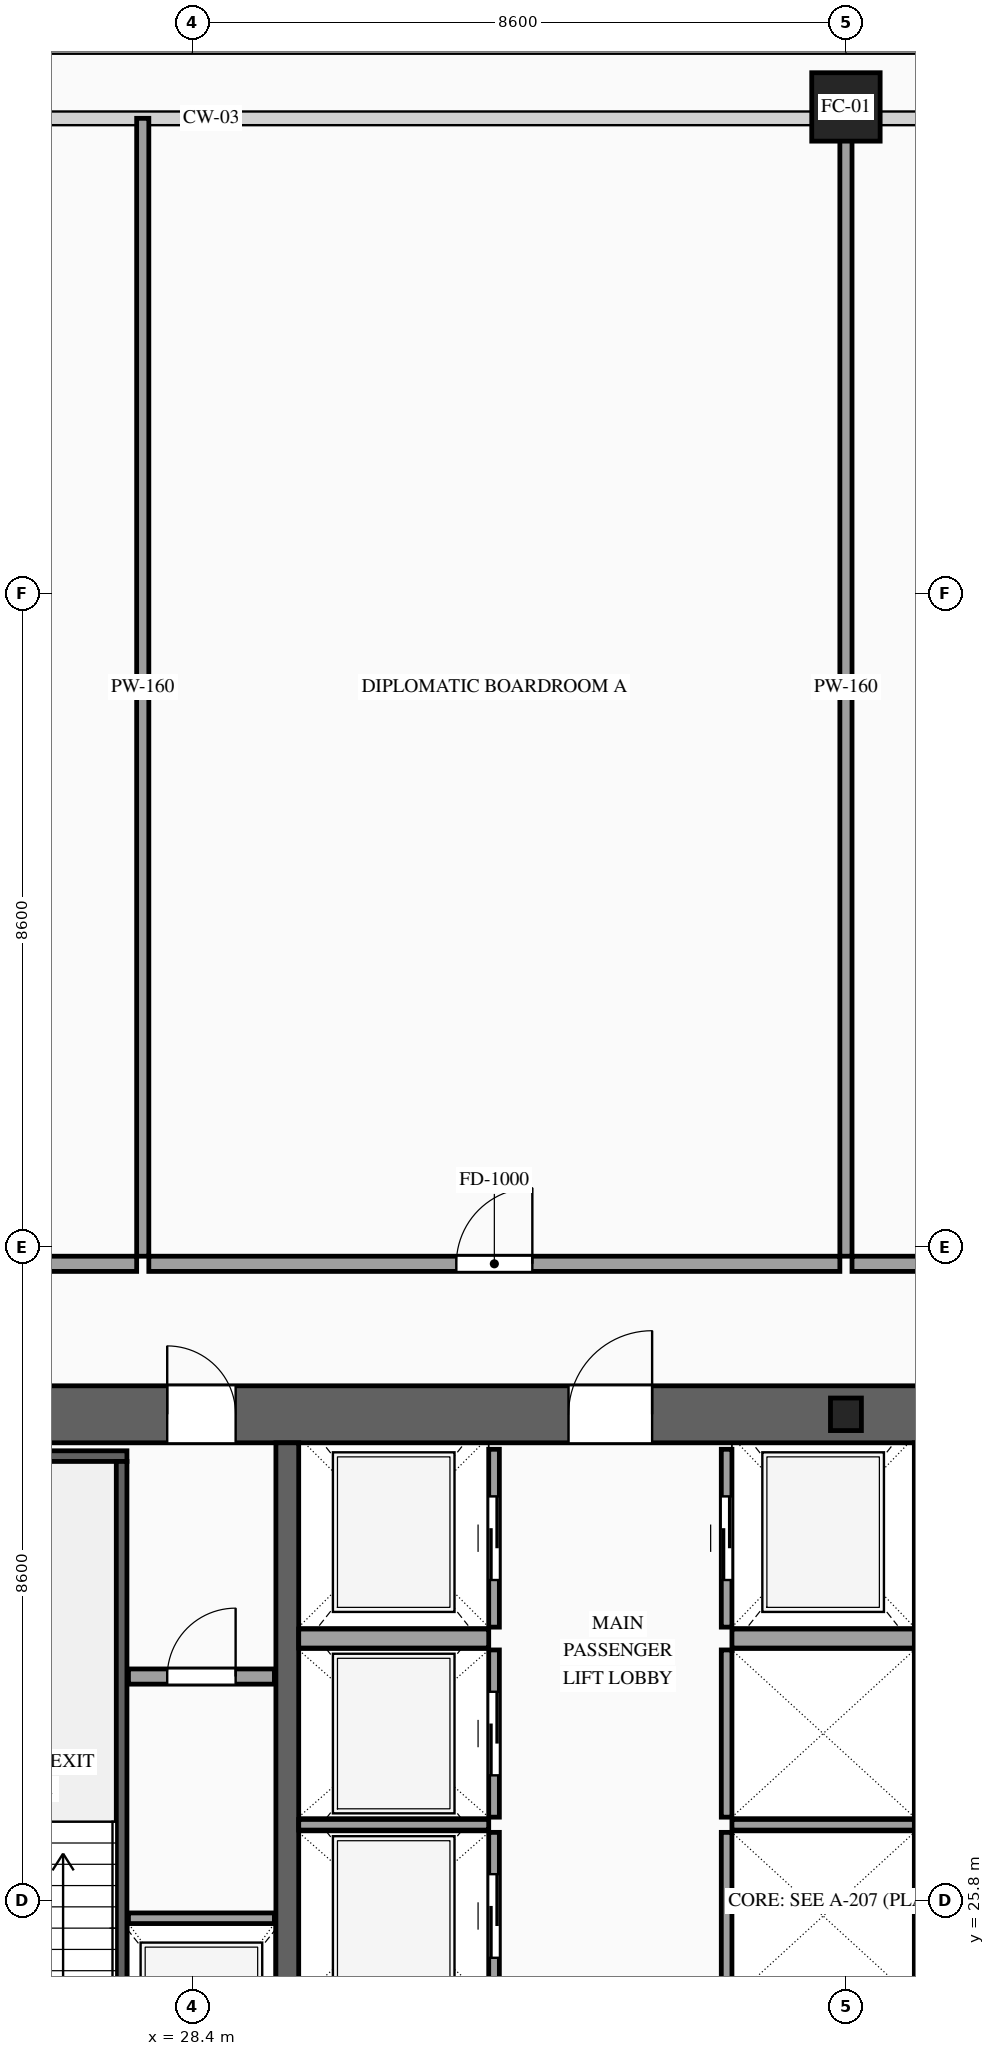
"""IFC4 building model, lengths in metres.
Left out: names, types, materials, properties, quantities, classifications, styles, units other than length and angle.
Written with IfcOpenShell. Run it as: python <this file> out.ifc"""

import sys

from ifc_helpers import new_model, si_unit, direction, frame, frame_2d, origin, origin_2d, place, context, subcontext, project, spatial, rectangle, hollow_rectangle, i_section, extrude, source, transform, mapped, element, fill, save


model = new_model("IFC4")
c1 = context("Model", 3, precision=1e-05, world=origin(), true_north=direction((0.0, 1.0)))
c2 = subcontext(c1, "Body", "Model", "MODEL_VIEW")
j1 = project(units=[si_unit("LENGTHUNIT", "METRE"), si_unit("PLANEANGLEUNIT", "RADIAN")], contexts=[c1])
p1 = place(None, origin())
s1 = spatial("IfcSite", under=j1, at=p1, CompositionType="ELEMENT")
p2 = place(p1, origin())
s2 = spatial("IfcBuilding", under=s1, at=p2, CompositionType="ELEMENT")
p3 = place(p2, frame((0.0, 0.0, 108.2)))
s3 = spatial("IfcBuildingStorey", under=s2, at=p3, CompositionType="ELEMENT", Elevation=108.2)
p4 = place(p3, frame((23.425, 32.2, 0.0), z_axis=(0.0, 0.0, 1.0), x_axis=(1.0, 0.0, 0.0)))
e1 = element("IfcWall", 1, at=p4, inside=s3, PredefinedType="SHEAR", context=c2, shape_type="SweptSolid", body=[
    extrude(rectangle(XDim=27.15, YDim=0.75, at=frame_2d((13.575, 0.0))), origin(), (0.0, 0.0, 1.0), 3.6),
])
p5 = place(p4, frame((4.645, 0.0, 0.0)))
e2 = element("IfcOpeningElement", 2, at=p5, cuts=e1, PredefinedType="OPENING", context=c2, shape_type="SweptSolid", body=[
    extrude(rectangle(XDim=0.9, YDim=2.15, at=frame_2d((0.45, 1.075))), frame((0.0, 0.39, 0.0), z_axis=(0.0, -1.0, 0.0), x_axis=(1.0, 0.0, 0.0)), (0.0, 0.0, 1.0), 0.78),
])
p6 = place(p4, frame((9.925, 0.0, 0.0)))
e3 = element("IfcOpeningElement", 3, at=p6, cuts=e1, PredefinedType="OPENING", context=c2, shape_type="SweptSolid", body=[
    extrude(rectangle(XDim=1.1, YDim=2.2, at=frame_2d((0.55, 1.1))), frame((0.0, 0.39, 0.0), z_axis=(0.0, -1.0, 0.0), x_axis=(1.0, 0.0, 0.0)), (0.0, 0.0, 1.0), 0.78),
])
p7 = place(p4, frame((15.775, 0.0, 0.0)))
e4 = element("IfcOpeningElement", 4, at=p7, cuts=e1, PredefinedType="OPENING", context=c2, shape_type="SweptSolid", body=[
    extrude(rectangle(XDim=1.1, YDim=2.2, at=frame_2d((0.55, 1.1))), frame((0.0, 0.39, 0.0), z_axis=(0.0, -1.0, 0.0), x_axis=(1.0, 0.0, 0.0)), (0.0, 0.0, 1.0), 0.78),
])
p8 = place(p4, frame((19.745, 0.0, 0.0)))
e5 = element("IfcOpeningElement", 5, at=p8, cuts=e1, PredefinedType="OPENING", context=c2, shape_type="SweptSolid", body=[
    extrude(rectangle(XDim=0.9, YDim=2.15, at=frame_2d((0.45, 1.075))), frame((0.0, 0.39, 0.0), z_axis=(0.0, -1.0, 0.0), x_axis=(1.0, 0.0, 0.0)), (0.0, 0.0, 1.0), 0.78),
])
m1 = source(origin(), c2, "Body", "SweptSolid", [
    extrude(rectangle(XDim=12.05, YDim=0.3, at=frame_2d((6.025, 0.0))), origin(), (0.0, 0.0, 1.0), 3.6),
])
for number, where, z_axis, x_axis in (
    (6, (29.65, 19.775, 0.0), (0.0, 0.0, 1.0), (0.0, 1.0, 0.0)),
    (7, (38.05, 19.775, 0.0), (0.0, 0.0, 1.0), (0.0, 1.0, 0.0)),
):
    element("IfcWall", number, at=place(p3, frame(where, z_axis=z_axis, x_axis=x_axis)), inside=s3, PredefinedType="SOLIDWALL", context=c2, shape_type="MappedRepresentation", body=[
        mapped(m1, transform((0.0, 0.0, 0.0), scale=1.0)),
    ])
m2 = source(origin(), c2, "Body", "SweptSolid", [
    extrude(i_section(OverallWidth=0.407, OverallDepth=0.428, WebThickness=0.02, FlangeThickness=0.035, at=origin_2d()), origin(), (0.0, 0.0, 1.0), 3.6),
])
p9 = place(p3, frame((37.0, 32.2, 0.0), z_axis=(0.0, 0.0, 1.0), x_axis=(1.0, 0.0, 0.0)))
e8 = element("IfcColumn", 8, at=p9, inside=s3, PredefinedType="COLUMN", context=c2, shape_type="MappedRepresentation", body=[
    mapped(m2, transform((0.0, 0.0, 0.0), scale=1.0)),
])
m3 = source(origin(), c2, "Body", "SweptSolid", [
    extrude(hollow_rectangle(XDim=0.9, YDim=0.9, WallThickness=0.042, at=origin_2d()), origin(), (0.0, 0.0, 1.0), 3.6),
])
p10 = place(p3, frame((37.0, 49.4, 0.0), z_axis=(0.0, 0.0, 1.0), x_axis=(1.0, 0.0, 0.0)))
e9 = element("IfcColumn", 9, at=p10, inside=s3, PredefinedType="COLUMN", context=c2, shape_type="MappedRepresentation", body=[
    mapped(m3, transform((0.0, 0.0, 0.0), scale=1.0)),
])
m4 = source(origin(), c2, "Body", "SweptSolid", [
    extrude(rectangle(XDim=1.92, YDim=0.14, at=frame_2d((0.96, 0.0))), origin(), (0.0, 0.0, 1.0), 3.38),
])
p11 = place(p3, frame((27.56, 25.57, 0.0), z_axis=(0.0, 0.0, 1.0), x_axis=(1.0, 0.0, 0.0)))
e10 = element("IfcWall", 10, at=p11, inside=s3, PredefinedType="SOLIDWALL", context=c2, shape_type="MappedRepresentation", body=[
    mapped(m4, transform((0.0, 0.0, 0.0), scale=1.0)),
])
p12 = place(p3, frame((32.37, 24.5, 0.0), z_axis=(0.0, 0.0, 1.0), x_axis=(0.0, 1.0, 0.0)))
e11 = element("IfcWall", 11, at=p12, inside=s3, PredefinedType="SOLIDWALL", context=c2, shape_type="SweptSolid", body=[
    extrude(rectangle(XDim=2.2, YDim=0.14, at=frame_2d((1.1, 0.0))), origin(), (0.0, 0.0, 1.0), 3.38),
])
p13 = place(p12, frame((0.55, 0.0, 0.0)))
e12 = element("IfcOpeningElement", 12, at=p13, cuts=e11, PredefinedType="OPENING", context=c2, shape_type="SweptSolid", body=[
    extrude(rectangle(XDim=1.1, YDim=2.2, at=frame_2d((0.55, 1.1))), frame((0.0, 0.085, 0.0), z_axis=(0.0, -1.0, 0.0), x_axis=(1.0, 0.0, 0.0)), (0.0, 0.0, 1.0), 0.17),
])
m5 = source(origin(), c2, "Body", "SweptSolid", [
    extrude(rectangle(XDim=2.5, YDim=0.14, at=frame_2d((1.25, 0.0))), origin(), (0.0, 0.0, 1.0), 3.38),
])
p14 = place(p3, frame((29.8, 26.8, 0.0), z_axis=(0.0, 0.0, 1.0), x_axis=(1.0, 0.0, 0.0)))
e13 = element("IfcWall", 13, at=p14, inside=s3, PredefinedType="SOLIDWALL", context=c2, shape_type="MappedRepresentation", body=[
    mapped(m5, transform((0.0, 0.0, 0.0), scale=1.0)),
])
p15 = place(p3, frame((32.37, 26.9, 0.0), z_axis=(0.0, 0.0, 1.0), x_axis=(0.0, 1.0, 0.0)))
e14 = element("IfcWall", 14, at=p15, inside=s3, PredefinedType="SOLIDWALL", context=c2, shape_type="SweptSolid", body=[
    extrude(rectangle(XDim=2.2, YDim=0.14, at=frame_2d((1.1, 0.0))), origin(), (0.0, 0.0, 1.0), 3.38),
])
p16 = place(p15, frame((0.55, 0.0, 0.0)))
e15 = element("IfcOpeningElement", 15, at=p16, cuts=e14, PredefinedType="OPENING", context=c2, shape_type="SweptSolid", body=[
    extrude(rectangle(XDim=1.1, YDim=2.2, at=frame_2d((0.55, 1.1))), frame((0.0, 0.085, 0.0), z_axis=(0.0, -1.0, 0.0), x_axis=(1.0, 0.0, 0.0)), (0.0, 0.0, 1.0), 0.17),
])
p17 = place(p3, frame((32.37, 29.4, 0.0), z_axis=(0.0, 0.0, 1.0), x_axis=(0.0, 1.0, 0.0)))
e16 = element("IfcWall", 16, at=p17, inside=s3, PredefinedType="SOLIDWALL", context=c2, shape_type="SweptSolid", body=[
    extrude(rectangle(XDim=2.34, YDim=0.14, at=frame_2d((1.17, 0.0))), origin(), (0.0, 0.0, 1.0), 3.38),
])
p18 = place(p17, frame((0.62, 0.0, 0.0)))
e17 = element("IfcOpeningElement", 17, at=p18, cuts=e16, PredefinedType="OPENING", context=c2, shape_type="SweptSolid", body=[
    extrude(rectangle(XDim=1.1, YDim=2.2, at=frame_2d((0.55, 1.1))), frame((0.0, 0.085, 0.0), z_axis=(0.0, -1.0, 0.0), x_axis=(1.0, 0.0, 0.0)), (0.0, 0.0, 1.0), 0.17),
])
m6 = source(origin(), c2, "Body", "SweptSolid", [
    extrude(rectangle(XDim=2.5, YDim=0.25, at=frame_2d((1.25, 0.0))), origin(), (0.0, 0.0, 1.0), 3.38),
])
p19 = place(p3, frame((29.8, 29.25, 0.0), z_axis=(0.0, 0.0, 1.0), x_axis=(1.0, 0.0, 0.0)))
e18 = element("IfcWall", 18, at=p19, inside=s3, PredefinedType="SOLIDWALL", context=c2, shape_type="MappedRepresentation", body=[
    mapped(m6, transform((0.0, 0.0, 0.0), scale=1.0)),
])
m7 = source(origin(), c2, "Body", "SweptSolid", [
    extrude(rectangle(XDim=2.2, YDim=0.14, at=frame_2d((1.1, 0.0))), origin(), (0.0, 0.0, 1.0), 3.38),
])
p20 = place(p3, frame((35.43, 24.5, 0.0), z_axis=(0.0, 0.0, 1.0), x_axis=(0.0, 1.0, 0.0)))
e19 = element("IfcWall", 19, at=p20, inside=s3, PredefinedType="SOLIDWALL", context=c2, shape_type="MappedRepresentation", body=[
    mapped(m7, transform((0.0, 0.0, 0.0), scale=1.0)),
])
m8 = source(origin(), c2, "Body", "SweptSolid", [
    extrude(rectangle(XDim=2.4, YDim=0.14, at=frame_2d((1.2, 0.0))), origin(), (0.0, 0.0, 1.0), 3.38),
])
p21 = place(p3, frame((35.5, 26.8, 0.0), z_axis=(0.0, 0.0, 1.0), x_axis=(1.0, 0.0, 0.0)))
e20 = element("IfcWall", 20, at=p21, inside=s3, PredefinedType="SOLIDWALL", context=c2, shape_type="MappedRepresentation", body=[
    mapped(m8, transform((0.0, 0.0, 0.0), scale=1.0)),
])
m9 = source(origin(), c2, "Body", "SweptSolid", [
    extrude(rectangle(XDim=2.2, YDim=0.14, at=frame_2d((1.1, 0.0))), origin(), (0.0, 0.0, 1.0), 3.38),
])
p22 = place(p3, frame((35.43, 26.9, 0.0), z_axis=(0.0, 0.0, 1.0), x_axis=(0.0, 1.0, 0.0)))
e21 = element("IfcWall", 21, at=p22, inside=s3, PredefinedType="SOLIDWALL", context=c2, shape_type="MappedRepresentation", body=[
    mapped(m9, transform((0.0, 0.0, 0.0), scale=1.0)),
])
p23 = place(p3, frame((35.43, 29.4, 0.0), z_axis=(0.0, 0.0, 1.0), x_axis=(0.0, 1.0, 0.0)))
e22 = element("IfcWall", 22, at=p23, inside=s3, PredefinedType="SOLIDWALL", context=c2, shape_type="SweptSolid", body=[
    extrude(rectangle(XDim=2.34, YDim=0.14, at=frame_2d((1.17, 0.0))), origin(), (0.0, 0.0, 1.0), 3.38),
])
p24 = place(p23, frame((0.62, 0.0, 0.0)))
e23 = element("IfcOpeningElement", 23, at=p24, cuts=e22, PredefinedType="OPENING", context=c2, shape_type="SweptSolid", body=[
    extrude(rectangle(XDim=1.1, YDim=2.2, at=frame_2d((0.55, 1.1))), frame((0.0, 0.085, 0.0), z_axis=(0.0, -1.0, 0.0), x_axis=(1.0, 0.0, 0.0)), (0.0, 0.0, 1.0), 0.17),
])
m10 = source(origin(), c2, "Body", "SweptSolid", [
    extrude(rectangle(XDim=2.4, YDim=0.25, at=frame_2d((1.2, 0.0))), origin(), (0.0, 0.0, 1.0), 3.38),
])
p25 = place(p3, frame((35.5, 29.25, 0.0), z_axis=(0.0, 0.0, 1.0), x_axis=(1.0, 0.0, 0.0)))
e24 = element("IfcWall", 24, at=p25, inside=s3, PredefinedType="SOLIDWALL", context=c2, shape_type="MappedRepresentation", body=[
    mapped(m10, transform((0.0, 0.0, 0.0), scale=1.0)),
])
m11 = source(origin(), c2, "Body", "SweptSolid", [
    extrude(rectangle(XDim=3.28, YDim=0.14, at=frame_2d((1.64, 0.0))), origin(), (0.0, 0.0, 1.0), 3.38),
])
p26 = place(p3, frame((24.26, 31.65, 0.0), z_axis=(0.0, 0.0, 1.0), x_axis=(1.0, 0.0, 0.0)))
e25 = element("IfcWall", 25, at=p26, inside=s3, PredefinedType="SOLIDWALL", context=c2, shape_type="MappedRepresentation", body=[
    mapped(m11, transform((0.0, 0.0, 0.0), scale=1.0)),
])
m12 = source(origin(), c2, "Body", "SweptSolid", [
    extrude(rectangle(XDim=8.94, YDim=0.14, at=frame_2d((4.47, 0.0))), origin(), (0.0, 0.0, 1.0), 3.38),
])
p27 = place(p3, frame((27.47, 22.64, 0.0), z_axis=(0.0, 0.0, 1.0), x_axis=(0.0, 1.0, 0.0)))
e26 = element("IfcWall", 26, at=p27, inside=s3, PredefinedType="SOLIDWALL", context=c2, shape_type="MappedRepresentation", body=[
    mapped(m12, transform((0.0, 0.0, 0.0), scale=1.0)),
])
p28 = place(p3, frame((27.56, 28.75, 0.0), z_axis=(0.0, 0.0, 1.0), x_axis=(1.0, 0.0, 0.0)))
e27 = element("IfcWall", 27, at=p28, inside=s3, PredefinedType="PARTITIONING", context=c2, shape_type="SweptSolid", body=[
    extrude(rectangle(XDim=1.92, YDim=0.2, at=frame_2d((0.96, 0.0))), origin(), (0.0, 0.0, 1.0), 3.38),
])
p29 = place(p28, frame((0.51, 0.0, 0.0)))
e28 = element("IfcOpeningElement", 28, at=p29, cuts=e27, PredefinedType="OPENING", context=c2, shape_type="SweptSolid", body=[
    extrude(rectangle(XDim=0.9, YDim=2.15, at=frame_2d((0.45, 1.075))), frame((0.0, 0.115, 0.0), z_axis=(0.0, -1.0, 0.0), x_axis=(1.0, 0.0, 0.0)), (0.0, 0.0, 1.0), 0.23),
])
p30 = place(p3, frame((16.44, 34.18, 0.0), z_axis=(0.0, 0.0, 1.0), x_axis=(1.0, 0.0, 0.0)))
e29 = element("IfcWall", 29, at=p30, inside=s3, PredefinedType="PARTITIONING", context=c2, shape_type="SweptSolid", body=[
    extrude(rectangle(XDim=11.228, YDim=0.2, at=frame_2d((5.614, 0.0))), origin(), (0.0, 0.0, 1.0), 3.38),
])
p31 = place(p30, frame((6.319, 0.0, 0.0)))
e30 = element("IfcOpeningElement", 30, at=p31, cuts=e29, PredefinedType="OPENING", context=c2, shape_type="SweptSolid", body=[
    extrude(rectangle(XDim=1.0, YDim=2.2, at=frame_2d((0.5, 1.1))), frame((0.0, 0.115, 0.0), z_axis=(0.0, -1.0, 0.0), x_axis=(1.0, 0.0, 0.0)), (0.0, 0.0, 1.0), 0.23),
])
m13 = source(origin(), c2, "Body", "SweptSolid", [
    extrude(rectangle(XDim=14.97, YDim=0.16, at=frame_2d((7.485, 0.0))), origin(), (0.0, 0.0, 1.0), 3.38),
])
p32 = place(p3, frame((27.748, 34.28, 0.0), z_axis=(0.0, 0.0, 1.0), x_axis=(0.0, 1.0, 0.0)))
e31 = element("IfcWall", 31, at=p32, inside=s3, PredefinedType="PARTITIONING", context=c2, shape_type="MappedRepresentation", body=[
    mapped(m13, transform((0.0, 0.0, 0.0), scale=1.0)),
])
p33 = place(p3, frame((27.828, 34.18, 0.0), z_axis=(0.0, 0.0, 1.0), x_axis=(1.0, 0.0, 0.0)))
e32 = element("IfcWall", 32, at=p33, inside=s3, PredefinedType="PARTITIONING", context=c2, shape_type="SweptSolid", body=[
    extrude(rectangle(XDim=9.092, YDim=0.2, at=frame_2d((4.546, 0.0))), origin(), (0.0, 0.0, 1.0), 3.38),
])
p34 = place(p33, frame((4.046, 0.0, 0.0)))
e33 = element("IfcOpeningElement", 33, at=p34, cuts=e32, PredefinedType="OPENING", context=c2, shape_type="SweptSolid", body=[
    extrude(rectangle(XDim=1.0, YDim=2.2, at=frame_2d((0.5, 1.1))), frame((0.0, 0.115, 0.0), z_axis=(0.0, -1.0, 0.0), x_axis=(1.0, 0.0, 0.0)), (0.0, 0.0, 1.0), 0.23),
])
m14 = source(origin(), c2, "Body", "SweptSolid", [
    extrude(rectangle(XDim=14.97, YDim=0.16, at=frame_2d((7.485, 0.0))), origin(), (0.0, 0.0, 1.0), 2.675),
])
p35 = place(p3, frame((37.0, 34.28, 0.0), z_axis=(0.0, 0.0, 1.0), x_axis=(0.0, 1.0, 0.0)))
e34 = element("IfcWall", 34, at=p35, inside=s3, PredefinedType="PARTITIONING", context=c2, shape_type="MappedRepresentation", body=[
    mapped(m14, transform((0.0, 0.0, 0.0), scale=1.0)),
])
p36 = place(p3, frame((37.08, 34.18, 0.0), z_axis=(0.0, 0.0, 1.0), x_axis=(1.0, 0.0, 0.0)))
e35 = element("IfcWall", 35, at=p36, inside=s3, PredefinedType="PARTITIONING", context=c2, shape_type="SweptSolid", body=[
    extrude(rectangle(XDim=11.148, YDim=0.2, at=frame_2d((5.574, 0.0))), origin(), (0.0, 0.0, 1.0), 3.38),
])
p37 = place(p36, frame((5.074, 0.0, 0.0)))
e36 = element("IfcOpeningElement", 36, at=p37, cuts=e35, PredefinedType="OPENING", context=c2, shape_type="SweptSolid", body=[
    extrude(rectangle(XDim=1.0, YDim=2.2, at=frame_2d((0.5, 1.1))), frame((0.0, 0.115, 0.0), z_axis=(0.0, -1.0, 0.0), x_axis=(1.0, 0.0, 0.0)), (0.0, 0.0, 1.0), 0.23),
])
m15 = source(origin(), c2, "Body", "SweptSolid", [
    extrude(rectangle(XDim=1.1, YDim=2.2, at=frame_2d((0.55, 1.1))), frame((0.0, 0.025, 0.0), z_axis=(0.0, -1.0, 0.0), x_axis=(1.0, 0.0, 0.0)), (0.0, 0.0, 1.0), 0.05),
])
p38 = place(p13, origin())
e37 = element("IfcDoor", 37, at=p38, inside=s3, OperationType="SLIDING_TO_LEFT", PredefinedType="DOOR", context=c2, shape_type="MappedRepresentation", body=[
    mapped(m15, transform((0.0, 0.0, 0.0), scale=1.0)),
])
fill(e12, e37)
p39 = place(p16, origin())
e38 = element("IfcDoor", 38, at=p39, inside=s3, OperationType="SLIDING_TO_RIGHT", PredefinedType="DOOR", context=c2, shape_type="MappedRepresentation", body=[
    mapped(m15, transform((0.0, 0.0, 0.0), scale=1.0)),
])
fill(e15, e38)
p40 = place(p18, origin())
e39 = element("IfcDoor", 39, at=p40, inside=s3, OperationType="SLIDING_TO_LEFT", PredefinedType="DOOR", context=c2, shape_type="MappedRepresentation", body=[
    mapped(m15, transform((0.0, 0.0, 0.0), scale=1.0)),
])
fill(e17, e39)
p41 = place(p24, origin())
e40 = element("IfcDoor", 40, at=p41, inside=s3, OperationType="SLIDING_TO_RIGHT", PredefinedType="DOOR", context=c2, shape_type="MappedRepresentation", body=[
    mapped(m15, transform((0.0, 0.0, 0.0), scale=1.0)),
])
fill(e23, e40)
m16 = source(origin(), c2, "Body", "SweptSolid", [
    extrude(rectangle(XDim=0.9, YDim=2.15, at=frame_2d((0.45, 1.075))), frame((0.0, 0.025, 0.0), z_axis=(0.0, -1.0, 0.0), x_axis=(1.0, 0.0, 0.0)), (0.0, 0.0, 1.0), 0.05),
])
p42 = place(p5, origin())
e41 = element("IfcDoor", 41, at=p42, inside=s3, OperationType="SINGLE_SWING_LEFT", PredefinedType="DOOR", context=c2, shape_type="MappedRepresentation", body=[
    mapped(m16, transform((0.0, 0.0, 0.0), scale=1.0)),
])
fill(e2, e41)
m17 = source(origin(), c2, "Body", "SweptSolid", [
    extrude(rectangle(XDim=1.1, YDim=2.2, at=frame_2d((0.55, 1.1))), frame((0.0, 0.025, 0.0), z_axis=(0.0, -1.0, 0.0), x_axis=(1.0, 0.0, 0.0)), (0.0, 0.0, 1.0), 0.05),
])
p43 = place(p6, origin())
e42 = element("IfcDoor", 42, at=p43, inside=s3, OperationType="SINGLE_SWING_RIGHT", PredefinedType="DOOR", context=c2, shape_type="MappedRepresentation", body=[
    mapped(m17, transform((0.0, 0.0, 0.0), scale=1.0)),
])
fill(e3, e42)
p44 = place(p29, origin())
e43 = element("IfcDoor", 43, at=p44, inside=s3, OperationType="SINGLE_SWING_RIGHT", PredefinedType="DOOR", context=c2, shape_type="MappedRepresentation", body=[
    mapped(m16, transform((0.0, 0.0, 0.0), scale=1.0)),
])
fill(e28, e43)
m18 = source(origin(), c2, "Body", "SweptSolid", [
    extrude(rectangle(XDim=1.0, YDim=2.2, at=frame_2d((0.5, 1.1))), frame((0.0, 0.025, 0.0), z_axis=(0.0, -1.0, 0.0), x_axis=(1.0, 0.0, 0.0)), (0.0, 0.0, 1.0), 0.05),
])
p45 = place(p34, origin())
e44 = element("IfcDoor", 44, at=p45, inside=s3, OperationType="SINGLE_SWING_RIGHT", PredefinedType="DOOR", context=c2, shape_type="MappedRepresentation", body=[
    mapped(m18, transform((0.0, 0.0, 0.0), scale=1.0)),
])
fill(e33, e44)
save(model, sys.argv[1])
